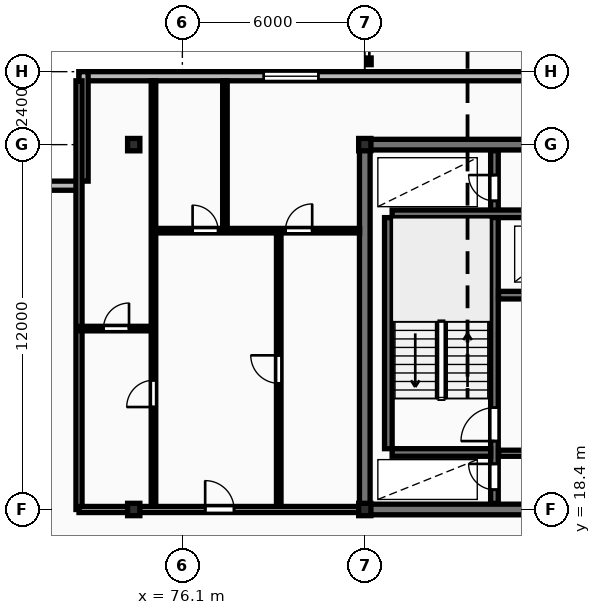
"""IFC4 building model, lengths in metres.
Left out: names, types, materials, properties, quantities, classifications, styles, units other than length and angle.
Written with IfcOpenShell. Run it as: python <this file> out.ifc"""

import sys

from ifc_helpers import new_model, si_unit, direction, frame, frame_2d, origin, origin_2d, place, context, subcontext, project, spatial, rectangle, i_section, extrude, element, fill, save


model = new_model("IFC4")
c1 = context("Model", 3, precision=1e-05, world=origin(), true_north=direction((0.0, 1.0)))
c2 = subcontext(c1, "Body", "Model", "MODEL_VIEW")
j1 = project(units=[si_unit("LENGTHUNIT", "METRE"), si_unit("PLANEANGLEUNIT", "RADIAN")], contexts=[c1])
p1 = place(None, origin())
s1 = spatial("IfcSite", under=j1, at=p1, CompositionType="ELEMENT")
p2 = place(p1, origin())
s2 = spatial("IfcBuilding", under=s1, at=p2, CompositionType="ELEMENT")
p3 = place(p2, frame((0.0, 0.0, 150.1)))
s3 = spatial("IfcBuildingStorey", under=s2, at=p3, CompositionType="ELEMENT", Elevation=150.1)
for number, where, z_axis, x_axis in (
    (1, (74.5, 18.4, 0.0), (0.0, 0.0, 1.0), (1.0, 0.0, 0.0)),
    (2, (74.5, 30.4, 0.0), (0.0, 0.0, 1.0), (1.0, 0.0, 0.0)),
    (3, (82.1, 18.4, 0.0), (0.0, 0.0, 1.0), (1.0, 0.0, 0.0)),
    (4, (82.1, 30.4, 0.0), (0.0, 0.0, 1.0), (1.0, 0.0, 0.0)),
):
    element("IfcColumn", number, at=place(p3, frame(where, z_axis=z_axis, x_axis=x_axis)), inside=s3, PredefinedType="COLUMN", context=c2, shape_type="SweptSolid", body=[
        extrude(i_section(OverallWidth=0.403, OverallDepth=0.406, WebThickness=0.027, FlangeThickness=0.043, FilletRadius=0.015, at=origin_2d()), origin(), (0.0, 0.0, 1.0), 3.6),
    ])
p4 = place(p3, frame((130.7, 32.65, 0.0), z_axis=(0.0, 0.0, 1.0), x_axis=(-1.0, 0.0, 0.0)))
e5 = element("IfcWall", 5, at=p4, inside=s3, PredefinedType="STANDARD", context=c2, shape_type="SweptSolid", body=[
    extrude(rectangle(XDim=58.0, YDim=0.3, at=frame_2d((29.0, 0.0))), origin(), (0.0, 0.0, 1.0), 3.31),
])
p5 = place(p4, frame((50.125, 0.0, 0.85)))
e6 = element("IfcOpeningElement", 6, at=p5, cuts=e5, PredefinedType="OPENING", context=c2, shape_type="SweptSolid", body=[
    extrude(rectangle(XDim=1.8, YDim=1.8, at=frame_2d((0.9, 0.9))), frame((0.0, 0.16, 0.0), z_axis=(0.0, -1.0, 0.0), x_axis=(1.0, 0.0, 0.0)), (0.0, 0.0, 1.0), 0.32),
])
p6 = place(p4, frame((6.775, 0.0, 0.85)))
e7 = element("IfcOpeningElement", 7, at=p6, cuts=e5, PredefinedType="OPENING", context=c2, shape_type="SweptSolid", body=[
    extrude(rectangle(XDim=1.8, YDim=1.8, at=frame_2d((0.9, 0.9))), frame((0.0, 0.16, 0.0), z_axis=(0.0, -1.0, 0.0), x_axis=(1.0, 0.0, 0.0)), (0.0, 0.0, 1.0), 0.32),
])
p7 = place(p4, frame((38.0, 0.0, 0.0)))
e8 = element("IfcOpeningElement", 8, at=p7, cuts=e5, PredefinedType="OPENING", context=c2, shape_type="SweptSolid", body=[
    extrude(rectangle(XDim=1.1, YDim=2.1, at=frame_2d((0.55, 1.05))), frame((0.0, 0.16, 0.0), z_axis=(0.0, -1.0, 0.0), x_axis=(1.0, 0.0, 0.0)), (0.0, 0.0, 1.0), 0.32),
])
p8 = place(p3, frame((72.85, 32.8, 0.0), z_axis=(0.0, 0.0, 1.0), x_axis=(0.0, -1.0, 0.0)))
e9 = element("IfcWall", 9, at=p8, inside=s3, PredefinedType="STANDARD", context=c2, shape_type="SweptSolid", body=[
    extrude(rectangle(XDim=3.6, YDim=0.3, at=frame_2d((1.8, 0.0))), origin(), (0.0, 0.0, 1.0), 3.31),
])
p9 = place(p3, frame((72.7, 29.05, 0.0), z_axis=(0.0, 0.0, 1.0), x_axis=(-1.0, 0.0, 0.0)))
e10 = element("IfcWall", 10, at=p9, inside=s3, PredefinedType="STANDARD", context=c2, shape_type="SweptSolid", body=[
    extrude(rectangle(XDim=3.6, YDim=0.3, at=frame_2d((1.8, 0.0))), origin(), (0.0, 0.0, 1.0), 3.31),
])
p10 = place(p3, frame((81.925, 30.4, 0.0), z_axis=(0.0, 0.0, 1.0), x_axis=(1.0, 0.0, 0.0)))
e11 = element("IfcWall", 11, at=p10, inside=s3, PredefinedType="SHEAR", context=c2, shape_type="SweptSolid", body=[
    extrude(rectangle(XDim=36.265, YDim=0.35, at=frame_2d((18.132, 0.0))), origin(), (0.0, 0.0, 1.0), 3.6),
])
p11 = place(p10, frame((9.675, 0.0, 0.0)))
e12 = element("IfcOpeningElement", 12, at=p11, cuts=e11, PredefinedType="OPENING", context=c2, shape_type="SweptSolid", body=[
    extrude(rectangle(XDim=1.1, YDim=2.1, at=frame_2d((0.55, 1.05))), frame((0.0, 0.185, 0.0), z_axis=(0.0, -1.0, 0.0), x_axis=(1.0, 0.0, 0.0)), (0.0, 0.0, 1.0), 0.37),
])
p12 = place(p3, frame((82.1, 18.575, 0.0), z_axis=(0.0, 0.0, 1.0), x_axis=(0.0, 1.0, 0.0)))
e13 = element("IfcWall", 13, at=p12, inside=s3, PredefinedType="SHEAR", context=c2, shape_type="SweptSolid", body=[
    extrude(rectangle(XDim=11.65, YDim=0.35, at=frame_2d((5.825, 0.0))), origin(), (0.0, 0.0, 1.0), 3.6),
])
p13 = place(p3, frame((81.925, 18.4, 0.0), z_axis=(0.0, 0.0, 1.0), x_axis=(1.0, 0.0, 0.0)))
e14 = element("IfcWall", 14, at=p13, inside=s3, PredefinedType="SHEAR", context=c2, shape_type="SweptSolid", body=[
    extrude(rectangle(XDim=36.265, YDim=0.35, at=frame_2d((18.132, 0.0))), origin(), (0.0, 0.0, 1.0), 3.6),
])
p14 = place(p13, frame((5.675, 0.0, 0.0)))
e15 = element("IfcOpeningElement", 15, at=p14, cuts=e14, PredefinedType="OPENING", context=c2, shape_type="SweptSolid", body=[
    extrude(rectangle(XDim=1.0, YDim=2.15, at=frame_2d((0.5, 1.075))), frame((0.0, 0.185, 0.0), z_axis=(0.0, -1.0, 0.0), x_axis=(1.0, 0.0, 0.0)), (0.0, 0.0, 1.0), 0.37),
])
p15 = place(p13, frame((21.925, 0.0, 0.0)))
e16 = element("IfcOpeningElement", 16, at=p15, cuts=e14, PredefinedType="OPENING", context=c2, shape_type="SweptSolid", body=[
    extrude(rectangle(XDim=1.5, YDim=2.2, at=frame_2d((0.75, 1.1))), frame((0.0, 0.185, 0.0), z_axis=(0.0, -1.0, 0.0), x_axis=(1.0, 0.0, 0.0)), (0.0, 0.0, 1.0), 0.37),
])
p16 = place(p13, frame((29.875, 0.0, 0.0)))
e17 = element("IfcOpeningElement", 17, at=p16, cuts=e14, PredefinedType="OPENING", context=c2, shape_type="SweptSolid", body=[
    extrude(rectangle(XDim=1.0, YDim=2.15, at=frame_2d((0.5, 1.075))), frame((0.0, 0.185, 0.0), z_axis=(0.0, -1.0, 0.0), x_axis=(1.0, 0.0, 0.0)), (0.0, 0.0, 1.0), 0.37),
])
p17 = place(p3, frame((82.875, 20.4, 0.0), z_axis=(0.0, 0.0, 1.0), x_axis=(0.0, 1.0, 0.0)))
e18 = element("IfcWall", 18, at=p17, inside=s3, PredefinedType="SHEAR", context=c2, shape_type="SweptSolid", body=[
    extrude(rectangle(XDim=7.6, YDim=0.25, at=frame_2d((3.8, 0.0))), origin(), (0.0, 0.0, 1.0), 3.6),
])
p18 = place(p3, frame((86.365, 18.6, 0.0), z_axis=(0.0, 0.0, 1.0), x_axis=(0.0, 1.0, 0.0)))
e19 = element("IfcWall", 19, at=p18, inside=s3, PredefinedType="SHEAR", context=c2, shape_type="SweptSolid", body=[
    extrude(rectangle(XDim=11.6, YDim=0.25, at=frame_2d((5.8, 0.0))), origin(), (0.0, 0.0, 1.0), 3.6),
])
p19 = place(p18, frame((0.45, 0.0, 0.0)))
e20 = element("IfcOpeningElement", 20, at=p19, cuts=e19, PredefinedType="OPENING", context=c2, shape_type="SweptSolid", body=[
    extrude(rectangle(XDim=0.85, YDim=2.05, at=frame_2d((0.425, 1.025))), frame((0.0, 0.135, 0.0), z_axis=(0.0, -1.0, 0.0), x_axis=(1.0, 0.0, 0.0)), (0.0, 0.0, 1.0), 0.27),
])
p20 = place(p18, frame((2.05, 0.0, 0.0)))
e21 = element("IfcOpeningElement", 21, at=p20, cuts=e19, PredefinedType="OPENING", context=c2, shape_type="SweptSolid", body=[
    extrude(rectangle(XDim=1.1, YDim=2.1, at=frame_2d((0.55, 1.05))), frame((0.0, 0.135, 0.0), z_axis=(0.0, -1.0, 0.0), x_axis=(1.0, 0.0, 0.0)), (0.0, 0.0, 1.0), 0.27),
])
p21 = place(p18, frame((9.95, 0.0, 0.0)))
e22 = element("IfcOpeningElement", 22, at=p21, cuts=e19, PredefinedType="OPENING", context=c2, shape_type="SweptSolid", body=[
    extrude(rectangle(XDim=0.85, YDim=2.05, at=frame_2d((0.425, 1.025))), frame((0.0, 0.135, 0.0), z_axis=(0.0, -1.0, 0.0), x_axis=(1.0, 0.0, 0.0)), (0.0, 0.0, 1.0), 0.27),
])
p22 = place(p3, frame((83.0, 20.275, 0.0), z_axis=(0.0, 0.0, 1.0), x_axis=(1.0, 0.0, 0.0)))
e23 = element("IfcWall", 23, at=p22, inside=s3, PredefinedType="SHEAR", context=c2, shape_type="SweptSolid", body=[
    extrude(rectangle(XDim=3.24, YDim=0.25, at=frame_2d((1.62, 0.0))), origin(), (0.0, 0.0, 1.0), 3.6),
])
p23 = place(p3, frame((83.0, 28.125, 0.0), z_axis=(0.0, 0.0, 1.0), x_axis=(1.0, 0.0, 0.0)))
e24 = element("IfcWall", 24, at=p23, inside=s3, PredefinedType="SHEAR", context=c2, shape_type="SweptSolid", body=[
    extrude(rectangle(XDim=7.82, YDim=0.25, at=frame_2d((3.91, 0.0))), origin(), (0.0, 0.0, 1.0), 3.6),
])
p24 = place(p3, frame((86.5, 25.45, 0.0), z_axis=(0.0, 0.0, 1.0), x_axis=(1.0, 0.0, 0.0)))
e25 = element("IfcWall", 25, at=p24, inside=s3, PredefinedType="SHEAR", context=c2, shape_type="SweptSolid", body=[
    extrude(rectangle(XDim=4.32, YDim=0.25, at=frame_2d((2.16, 0.0))), origin(), (0.0, 0.0, 1.0), 3.6),
])
p25 = place(p24, frame((1.14, 0.0, 0.0)))
e26 = element("IfcOpeningElement", 26, at=p25, cuts=e25, PredefinedType="OPENING", context=c2, shape_type="SweptSolid", body=[
    extrude(rectangle(XDim=1.12, YDim=2.12, at=frame_2d((0.56, 1.06))), frame((0.0, 0.135, 0.0), z_axis=(0.0, -1.0, 0.0), x_axis=(1.0, 0.0, 0.0)), (0.0, 0.0, 1.0), 0.27),
])
p26 = place(p24, frame((3.25, 0.0, 0.0)))
e27 = element("IfcOpeningElement", 27, at=p26, cuts=e25, PredefinedType="OPENING", context=c2, shape_type="SweptSolid", body=[
    extrude(rectangle(XDim=0.85, YDim=2.05, at=frame_2d((0.425, 1.025))), frame((0.0, 0.135, 0.0), z_axis=(0.0, -1.0, 0.0), x_axis=(1.0, 0.0, 0.0)), (0.0, 0.0, 1.0), 0.27),
])
p27 = place(p3, frame((86.5, 20.25, 0.0), z_axis=(0.0, 0.0, 1.0), x_axis=(1.0, 0.0, 0.0)))
e28 = element("IfcWall", 28, at=p27, inside=s3, PredefinedType="PARTITIONING", context=c2, shape_type="SweptSolid", body=[
    extrude(rectangle(XDim=4.32, YDim=0.2, at=frame_2d((2.16, 0.0))), origin(), (0.0, 0.0, 1.0), 3.31),
])
p28 = place(p27, frame((1.4, 0.0, 0.0)))
e29 = element("IfcOpeningElement", 29, at=p28, cuts=e28, PredefinedType="OPENING", context=c2, shape_type="SweptSolid", body=[
    extrude(rectangle(XDim=1.1, YDim=2.1, at=frame_2d((0.55, 1.05))), frame((0.0, 0.11, 0.0), z_axis=(0.0, -1.0, 0.0), x_axis=(1.0, 0.0, 0.0)), (0.0, 0.0, 1.0), 0.22),
])
p29 = place(p3, frame((72.7, 18.4, 0.0), z_axis=(0.0, 0.0, 1.0), x_axis=(0.0, 1.0, 0.0)))
e30 = element("IfcWall", 30, at=p29, inside=s3, PredefinedType="PARTITIONING", context=c2, shape_type="SweptSolid", body=[
    extrude(rectangle(XDim=14.1, YDim=0.2, at=frame_2d((7.05, 0.0))), origin(), (0.0, 0.0, 1.0), 3.31),
])
p30 = place(p3, frame((72.7, 24.35, 0.0), z_axis=(0.0, 0.0, 1.0), x_axis=(1.0, 0.0, 0.0)))
e31 = element("IfcWall", 31, at=p30, inside=s3, PredefinedType="PARTITIONING", context=c2, shape_type="SweptSolid", body=[
    extrude(rectangle(XDim=2.45, YDim=0.15, at=frame_2d((1.225, 0.0))), origin(), (0.0, 0.0, 1.0), 3.31),
])
p31 = place(p30, frame((0.805, 0.0, 0.0)))
e32 = element("IfcOpeningElement", 32, at=p31, cuts=e31, PredefinedType="OPENING", context=c2, shape_type="SweptSolid", body=[
    extrude(rectangle(XDim=0.84, YDim=2.04, at=frame_2d((0.42, 1.02))), frame((0.0, 0.085, 0.0), z_axis=(0.0, -1.0, 0.0), x_axis=(1.0, 0.0, 0.0)), (0.0, 0.0, 1.0), 0.17),
])
p32 = place(p3, frame((75.15, 18.45, 0.0), z_axis=(0.0, 0.0, 1.0), x_axis=(0.0, 1.0, 0.0)))
e33 = element("IfcWall", 33, at=p32, inside=s3, PredefinedType="PARTITIONING", context=c2, shape_type="SweptSolid", body=[
    extrude(rectangle(XDim=14.05, YDim=0.15, at=frame_2d((7.025, 0.0))), origin(), (0.0, 0.0, 1.0), 3.31),
])
p33 = place(p32, frame((3.32, 0.0, 0.0)))
e34 = element("IfcOpeningElement", 34, at=p33, cuts=e33, PredefinedType="OPENING", context=c2, shape_type="SweptSolid", body=[
    extrude(rectangle(XDim=0.88, YDim=2.06, at=frame_2d((0.44, 1.03))), frame((0.0, 0.085, 0.0), z_axis=(0.0, -1.0, 0.0), x_axis=(1.0, 0.0, 0.0)), (0.0, 0.0, 1.0), 0.17),
])
p34 = place(p3, frame((79.27, 18.45, 0.0), z_axis=(0.0, 0.0, 1.0), x_axis=(0.0, 1.0, 0.0)))
e35 = element("IfcWall", 35, at=p34, inside=s3, PredefinedType="PARTITIONING", context=c2, shape_type="SweptSolid", body=[
    extrude(rectangle(XDim=9.12, YDim=0.15, at=frame_2d((4.56, 0.0))), origin(), (0.0, 0.0, 1.0), 3.31),
])
p35 = place(p34, frame((4.1, 0.0, 0.0)))
e36 = element("IfcOpeningElement", 36, at=p35, cuts=e35, PredefinedType="OPENING", context=c2, shape_type="SweptSolid", body=[
    extrude(rectangle(XDim=0.92, YDim=2.08, at=frame_2d((0.46, 1.04))), frame((0.0, 0.085, 0.0), z_axis=(0.0, -1.0, 0.0), x_axis=(1.0, 0.0, 0.0)), (0.0, 0.0, 1.0), 0.17),
])
p36 = place(p3, frame((77.5, 27.57, 0.0), z_axis=(0.0, 0.0, 1.0), x_axis=(0.0, 1.0, 0.0)))
e37 = element("IfcWall", 37, at=p36, inside=s3, PredefinedType="PARTITIONING", context=c2, shape_type="SweptSolid", body=[
    extrude(rectangle(XDim=4.93, YDim=0.15, at=frame_2d((2.465, 0.0))), origin(), (0.0, 0.0, 1.0), 3.31),
])
p37 = place(p3, frame((75.17, 27.57, 0.0), z_axis=(0.0, 0.0, 1.0), x_axis=(1.0, 0.0, 0.0)))
e38 = element("IfcWall", 38, at=p37, inside=s3, PredefinedType="PARTITIONING", context=c2, shape_type="SweptSolid", body=[
    extrude(rectangle(XDim=6.76, YDim=0.15, at=frame_2d((3.38, 0.0))), origin(), (0.0, 0.0, 1.0), 3.31),
])
p38 = place(p37, frame((1.266, 0.0, 0.0)))
e39 = element("IfcOpeningElement", 39, at=p38, cuts=e38, PredefinedType="OPENING", context=c2, shape_type="SweptSolid", body=[
    extrude(rectangle(XDim=0.84, YDim=2.04, at=frame_2d((0.42, 1.02))), frame((0.0, 0.085, 0.0), z_axis=(0.0, -1.0, 0.0), x_axis=(1.0, 0.0, 0.0)), (0.0, 0.0, 1.0), 0.17),
])
p39 = place(p37, frame((4.32, 0.0, 0.0)))
e40 = element("IfcOpeningElement", 40, at=p39, cuts=e38, PredefinedType="OPENING", context=c2, shape_type="SweptSolid", body=[
    extrude(rectangle(XDim=0.88, YDim=2.06, at=frame_2d((0.44, 1.03))), frame((0.0, 0.085, 0.0), z_axis=(0.0, -1.0, 0.0), x_axis=(1.0, 0.0, 0.0)), (0.0, 0.0, 1.0), 0.17),
])
p40 = place(p3, frame((72.7, 18.4, 0.0), z_axis=(0.0, 0.0, 1.0), x_axis=(1.0, 0.0, 0.0)))
e41 = element("IfcWall", 41, at=p40, inside=s3, PredefinedType="PARTITIONING", context=c2, shape_type="SweptSolid", body=[
    extrude(rectangle(XDim=9.25, YDim=0.2, at=frame_2d((4.625, 0.0))), origin(), (0.0, 0.0, 1.0), 2.698),
])
p41 = place(p40, frame((4.15, 0.0, 0.0)))
e42 = element("IfcOpeningElement", 42, at=p41, cuts=e41, PredefinedType="OPENING", context=c2, shape_type="SweptSolid", body=[
    extrude(rectangle(XDim=0.95, YDim=2.15, at=frame_2d((0.475, 1.075))), frame((0.0, 0.11, 0.0), z_axis=(0.0, -1.0, 0.0), x_axis=(1.0, 0.0, 0.0)), (0.0, 0.0, 1.0), 0.22),
])
p42 = place(p5, origin())
e43 = element("IfcWindow", 43, at=p42, inside=s3, PartitioningType="SINGLE_PANEL", PredefinedType="WINDOW", context=c2, shape_type="SweptSolid", body=[
    extrude(rectangle(XDim=1.8, YDim=1.8, at=frame_2d((0.9, 0.9))), frame((0.0, 0.03, 0.0), z_axis=(0.0, -1.0, 0.0), x_axis=(1.0, 0.0, 0.0)), (0.0, 0.0, 1.0), 0.06),
])
fill(e6, e43)
p43 = place(p19, origin())
e44 = element("IfcDoor", 44, at=p43, inside=s3, OperationType="SINGLE_SWING_RIGHT", PredefinedType="DOOR", context=c2, shape_type="SweptSolid", body=[
    extrude(rectangle(XDim=0.85, YDim=2.05, at=frame_2d((0.425, 1.025))), frame((0.0, 0.025, 0.0), z_axis=(0.0, -1.0, 0.0), x_axis=(1.0, 0.0, 0.0)), (0.0, 0.0, 1.0), 0.05),
])
fill(e20, e44)
p44 = place(p20, origin())
e45 = element("IfcDoor", 45, at=p44, inside=s3, OperationType="SINGLE_SWING_LEFT", PredefinedType="DOOR", context=c2, shape_type="SweptSolid", body=[
    extrude(rectangle(XDim=1.1, YDim=2.1, at=frame_2d((0.55, 1.05))), frame((0.0, 0.025, 0.0), z_axis=(0.0, -1.0, 0.0), x_axis=(1.0, 0.0, 0.0)), (0.0, 0.0, 1.0), 0.05),
])
fill(e21, e45)
p45 = place(p21, origin())
e46 = element("IfcDoor", 46, at=p45, inside=s3, OperationType="SINGLE_SWING_RIGHT", PredefinedType="DOOR", context=c2, shape_type="SweptSolid", body=[
    extrude(rectangle(XDim=0.85, YDim=2.05, at=frame_2d((0.425, 1.025))), frame((0.0, 0.025, 0.0), z_axis=(0.0, -1.0, 0.0), x_axis=(1.0, 0.0, 0.0)), (0.0, 0.0, 1.0), 0.05),
])
fill(e22, e46)
p46 = place(p31, origin())
e47 = element("IfcDoor", 47, at=p46, inside=s3, OperationType="SINGLE_SWING_RIGHT", PredefinedType="DOOR", context=c2, shape_type="SweptSolid", body=[
    extrude(rectangle(XDim=0.84, YDim=2.04, at=frame_2d((0.42, 1.02))), frame((0.0, 0.025, 0.0), z_axis=(0.0, -1.0, 0.0), x_axis=(1.0, 0.0, 0.0)), (0.0, 0.0, 1.0), 0.05),
])
fill(e32, e47)
p47 = place(p33, origin())
e48 = element("IfcDoor", 48, at=p47, inside=s3, OperationType="SINGLE_SWING_LEFT", PredefinedType="DOOR", context=c2, shape_type="SweptSolid", body=[
    extrude(rectangle(XDim=0.88, YDim=2.06, at=frame_2d((0.44, 1.03))), frame((0.0, 0.025, 0.0), z_axis=(0.0, -1.0, 0.0), x_axis=(1.0, 0.0, 0.0)), (0.0, 0.0, 1.0), 0.05),
])
fill(e34, e48)
p48 = place(p35, origin())
e49 = element("IfcDoor", 49, at=p48, inside=s3, OperationType="SINGLE_SWING_RIGHT", PredefinedType="DOOR", context=c2, shape_type="SweptSolid", body=[
    extrude(rectangle(XDim=0.92, YDim=2.08, at=frame_2d((0.46, 1.04))), frame((0.0, 0.025, 0.0), z_axis=(0.0, -1.0, 0.0), x_axis=(1.0, 0.0, 0.0)), (0.0, 0.0, 1.0), 0.05),
])
fill(e36, e49)
p49 = place(p38, origin())
e50 = element("IfcDoor", 50, at=p49, inside=s3, OperationType="SINGLE_SWING_LEFT", PredefinedType="DOOR", context=c2, shape_type="SweptSolid", body=[
    extrude(rectangle(XDim=0.84, YDim=2.04, at=frame_2d((0.42, 1.02))), frame((0.0, 0.025, 0.0), z_axis=(0.0, -1.0, 0.0), x_axis=(1.0, 0.0, 0.0)), (0.0, 0.0, 1.0), 0.05),
])
fill(e39, e50)
p50 = place(p39, origin())
e51 = element("IfcDoor", 51, at=p50, inside=s3, OperationType="SINGLE_SWING_RIGHT", PredefinedType="DOOR", context=c2, shape_type="SweptSolid", body=[
    extrude(rectangle(XDim=0.88, YDim=2.06, at=frame_2d((0.44, 1.03))), frame((0.0, 0.025, 0.0), z_axis=(0.0, -1.0, 0.0), x_axis=(1.0, 0.0, 0.0)), (0.0, 0.0, 1.0), 0.05),
])
fill(e40, e51)
p51 = place(p41, origin())
e52 = element("IfcDoor", 52, at=p51, inside=s3, OperationType="SINGLE_SWING_LEFT", PredefinedType="DOOR", context=c2, shape_type="SweptSolid", body=[
    extrude(rectangle(XDim=0.95, YDim=2.15, at=frame_2d((0.475, 1.075))), frame((0.0, 0.025, 0.0), z_axis=(0.0, -1.0, 0.0), x_axis=(1.0, 0.0, 0.0)), (0.0, 0.0, 1.0), 0.05),
])
fill(e42, e52)
save(model, sys.argv[1])
